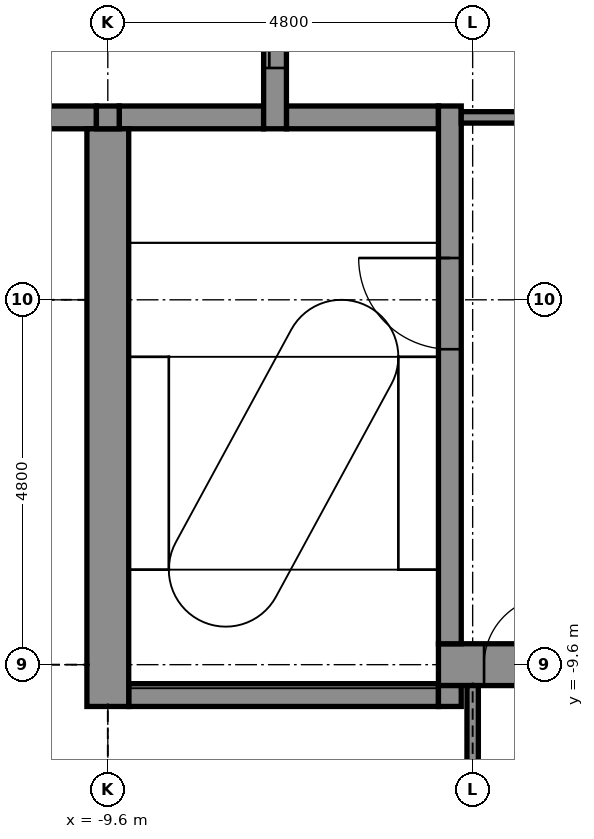
"""IFC4 building model, lengths in metres.
Left out: names, types, materials, properties, quantities, classifications, styles, units other than length and angle.
Written with IfcOpenShell. Run it as: python <this file> out.ifc"""

import sys

from ifc_helpers import new_model, si_unit, direction, frame, frame_2d, origin, place, context, subcontext, project, spatial, rectangle, extrude, element, fill, save


model = new_model("IFC4")
c1 = context("Model", 3, precision=1e-05, world=origin(), true_north=direction((0.0, 1.0)))
c2 = subcontext(c1, "Body", "Model", "MODEL_VIEW")
j1 = project(units=[si_unit("LENGTHUNIT", "METRE"), si_unit("PLANEANGLEUNIT", "RADIAN")], contexts=[c1])
p1 = place(None, origin())
s1 = spatial("IfcSite", under=j1, at=p1, CompositionType="ELEMENT")
p2 = place(p1, origin())
s2 = spatial("IfcBuilding", under=s1, at=p2, CompositionType="ELEMENT")
p3 = place(p2, frame((0.0, 0.0, 242.3)))
s3 = spatial("IfcBuildingStorey", under=s2, at=p3, CompositionType="ELEMENT", Elevation=242.3)
p4 = place(p3, frame((-9.325, -10.0, -0.15), z_axis=(0.0, 0.0, 1.0), x_axis=(1.0, 0.0, 0.0)))
e1 = element("IfcWall", 1, at=p4, inside=s3, PredefinedType="STANDARD", context=c2, shape_type="SweptSolid", body=[
    extrude(rectangle(XDim=4.075, YDim=0.3, at=frame_2d((2.038, 0.0))), origin(), (0.0, 0.0, 1.0), 3.9),
])
p5 = place(p3, frame((-5.25, -9.6, -0.15), z_axis=(0.0, 0.0, 1.0), x_axis=(1.0, 0.0, 0.0)))
e2 = element("IfcWall", 2, at=p5, inside=s3, PredefinedType="SHEAR", context=c2, shape_type="SweptSolid", body=[
    extrude(rectangle(XDim=10.2, YDim=0.55, at=frame_2d((5.1, 0.0))), origin(), (0.0, 0.0, 1.0), 3.9),
])
p6 = place(p5, frame((0.6, 0.0, 0.15)))
e3 = element("IfcOpeningElement", 3, at=p6, cuts=e2, PredefinedType="OPENING", context=c2, shape_type="SweptSolid", body=[
    extrude(rectangle(XDim=0.9, YDim=2.1, at=frame_2d((0.45, 1.05))), frame((0.0, 0.285, 0.0), z_axis=(0.0, -1.0, 0.0), x_axis=(1.0, 0.0, 0.0)), (0.0, 0.0, 1.0), 0.57),
])
p7 = place(p3, frame((-10.85, -2.4, -0.15), z_axis=(0.0, 0.0, 1.0), x_axis=(1.0, 0.0, 0.0)))
e4 = element("IfcWall", 4, at=p7, inside=s3, PredefinedType="STANDARD", context=c2, shape_type="SweptSolid", body=[
    extrude(rectangle(XDim=1.1, YDim=0.3, at=frame_2d((0.55, 0.0))), origin(), (0.0, 0.0, 1.0), 3.9),
])
p8 = place(p3, frame((-9.45, -2.4, -0.15), z_axis=(0.0, 0.0, 1.0), x_axis=(1.0, 0.0, 0.0)))
e5 = element("IfcWall", 5, at=p8, inside=s3, PredefinedType="STANDARD", context=c2, shape_type="SweptSolid", body=[
    extrude(rectangle(XDim=1.9, YDim=0.3, at=frame_2d((0.95, 0.0))), origin(), (0.0, 0.0, 1.0), 3.9),
])
p9 = place(p3, frame((-7.25, -2.4, -0.15), z_axis=(0.0, 0.0, 1.0), x_axis=(1.0, 0.0, 0.0)))
e6 = element("IfcWall", 6, at=p9, inside=s3, PredefinedType="STANDARD", context=c2, shape_type="SweptSolid", body=[
    extrude(rectangle(XDim=2.0, YDim=0.3, at=frame_2d((1.0, 0.0))), origin(), (0.0, 0.0, 1.0), 3.9),
])
p10 = place(p3, frame((-9.6, -10.15, -0.15), z_axis=(0.0, 0.0, 1.0), x_axis=(0.0, 1.0, 0.0)))
e7 = element("IfcWall", 7, at=p10, inside=s3, PredefinedType="SHEAR", context=c2, shape_type="SweptSolid", body=[
    extrude(rectangle(XDim=7.6, YDim=0.55, at=frame_2d((3.8, 0.0))), origin(), (0.0, 0.0, 1.0), 3.9),
])
p11 = place(p3, frame((-9.6, -2.55, -0.15), z_axis=(0.0, 0.0, 1.0), x_axis=(0.0, 1.0, 0.0)))
e8 = element("IfcWall", 8, at=p11, inside=s3, PredefinedType="STANDARD", context=c2, shape_type="SweptSolid", body=[
    extrude(rectangle(XDim=0.3, YDim=0.3, at=frame_2d((0.15, 0.0))), origin(), (0.0, 0.0, 1.0), 3.9),
])
p12 = place(p3, frame((-7.4, -2.55, -0.15), z_axis=(0.0, 0.0, 1.0), x_axis=(0.0, 1.0, 0.0)))
e9 = element("IfcWall", 9, at=p12, inside=s3, PredefinedType="STANDARD", context=c2, shape_type="SweptSolid", body=[
    extrude(rectangle(XDim=5.1, YDim=0.3, at=frame_2d((2.55, 0.0))), origin(), (0.0, 0.0, 1.0), 3.9),
])
p13 = place(p12, frame((0.8, 0.0, 0.15)))
e10 = element("IfcOpeningElement", 10, at=p13, cuts=e9, PredefinedType="OPENING", context=c2, shape_type="SweptSolid", body=[
    extrude(rectangle(XDim=1.1, YDim=2.1, at=frame_2d((0.55, 1.05))), frame((0.0, 0.16, 0.0), z_axis=(0.0, -1.0, 0.0), x_axis=(1.0, 0.0, 0.0)), (0.0, 0.0, 1.0), 0.32),
])
p14 = place(p12, frame((3.2, 0.0, 0.15)))
e11 = element("IfcOpeningElement", 11, at=p14, cuts=e9, PredefinedType="OPENING", context=c2, shape_type="SweptSolid", body=[
    extrude(rectangle(XDim=1.1, YDim=2.1, at=frame_2d((0.55, 1.05))), frame((0.0, 0.16, 0.0), z_axis=(0.0, -1.0, 0.0), x_axis=(1.0, 0.0, 0.0)), (0.0, 0.0, 1.0), 0.32),
])
p15 = place(p3, frame((-5.1, -10.15, -0.15), z_axis=(0.0, 0.0, 1.0), x_axis=(0.0, 1.0, 0.0)))
e12 = element("IfcWall", 12, at=p15, inside=s3, PredefinedType="STANDARD", context=c2, shape_type="SweptSolid", body=[
    extrude(rectangle(XDim=0.275, YDim=0.3, at=frame_2d((0.137, 0.0))), origin(), (0.0, 0.0, 1.0), 3.9),
])
p16 = place(p3, frame((-5.1, -9.325, -0.15), z_axis=(0.0, 0.0, 1.0), x_axis=(0.0, 1.0, 0.0)))
e13 = element("IfcWall", 13, at=p16, inside=s3, PredefinedType="STANDARD", context=c2, shape_type="SweptSolid", body=[
    extrude(rectangle(XDim=7.075, YDim=0.3, at=frame_2d((3.538, 0.0))), origin(), (0.0, 0.0, 1.0), 3.9),
])
p17 = place(p16, frame((3.875, 0.0, 0.15)))
e14 = element("IfcOpeningElement", 14, at=p17, cuts=e13, PredefinedType="OPENING", context=c2, shape_type="SweptSolid", body=[
    extrude(rectangle(XDim=1.2, YDim=2.1, at=frame_2d((0.6, 1.05))), frame((0.0, 0.16, 0.0), z_axis=(0.0, -1.0, 0.0), x_axis=(1.0, 0.0, 0.0)), (0.0, 0.0, 1.0), 0.32),
])
p18 = place(p3, frame((-4.8, -12.4, 0.0), z_axis=(0.0, 0.0, 1.0), x_axis=(0.0, 1.0, 0.0)))
e15 = element("IfcWall", 15, at=p18, inside=s3, PredefinedType="PARTITIONING", context=c2, shape_type="SweptSolid", body=[
    extrude(rectangle(XDim=2.525, YDim=0.15, at=frame_2d((1.262, 0.0))), origin(), (0.0, 0.0, 1.0), 3.217),
])
p19 = place(p3, frame((-4.95, -2.4, 0.0), z_axis=(0.0, 0.0, 1.0), x_axis=(1.0, 0.0, 0.0)))
e16 = element("IfcWall", 16, at=p19, inside=s3, PredefinedType="PARTITIONING", context=c2, shape_type="SweptSolid", body=[
    extrude(rectangle(XDim=1.2, YDim=0.15, at=frame_2d((0.6, 0.0))), origin(), (0.0, 0.0, 1.0), 3.75),
])
p20 = place(p13, origin())
e17 = element("IfcDoor", 17, at=p20, inside=s3, OperationType="DOUBLE_DOOR_SLIDING", PredefinedType="DOOR", context=c2, shape_type="SweptSolid", body=[
    extrude(rectangle(XDim=1.1, YDim=2.1, at=frame_2d((0.55, 1.05))), frame((0.0, 0.025, 0.0), z_axis=(0.0, -1.0, 0.0), x_axis=(1.0, 0.0, 0.0)), (0.0, 0.0, 1.0), 0.05),
])
fill(e10, e17)
p21 = place(p17, origin())
e18 = element("IfcDoor", 18, at=p21, inside=s3, OperationType="SINGLE_SWING_RIGHT", PredefinedType="DOOR", context=c2, shape_type="SweptSolid", body=[
    extrude(rectangle(XDim=1.2, YDim=2.1, at=frame_2d((0.6, 1.05))), frame((0.0, 0.025, 0.0), z_axis=(0.0, -1.0, 0.0), x_axis=(1.0, 0.0, 0.0)), (0.0, 0.0, 1.0), 0.05),
])
fill(e14, e18)
p22 = place(p6, origin())
e19 = element("IfcDoor", 19, at=p22, inside=s3, OperationType="SINGLE_SWING_RIGHT", PredefinedType="DOOR", context=c2, shape_type="SweptSolid", body=[
    extrude(rectangle(XDim=0.9, YDim=2.1, at=frame_2d((0.45, 1.05))), frame((0.0, 0.025, 0.0), z_axis=(0.0, -1.0, 0.0), x_axis=(1.0, 0.0, 0.0)), (0.0, 0.0, 1.0), 0.05),
])
fill(e3, e19)
save(model, sys.argv[1])
